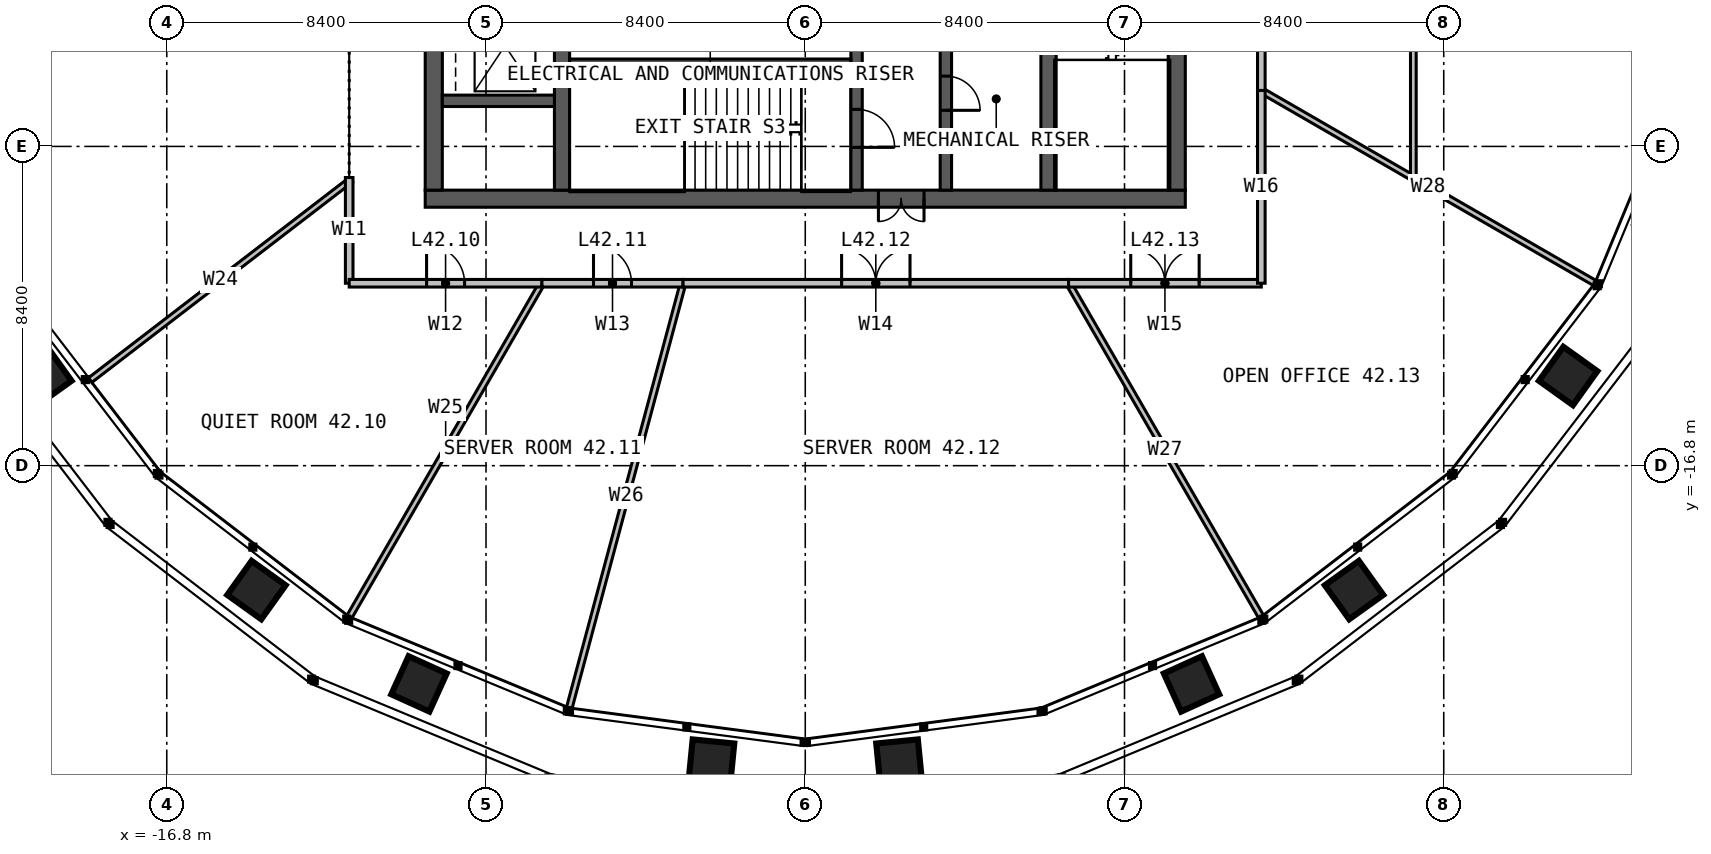
"""IFC4 building model, lengths in metres.
Left out: names, types, materials, properties, quantities, classifications, styles, units other than length and angle.
Written with IfcOpenShell. Run it as: python <this file> out.ifc"""

import sys

from ifc_helpers import new_model, si_unit, direction, frame, frame_2d, origin, place, context, subcontext, project, spatial, rectangle, extrude, element, fill, save


model = new_model("IFC4")
c1 = context("Model", 3, precision=1e-05, world=origin(), true_north=direction((0.0, 1.0)))
c2 = subcontext(c1, "Body", "Model", "MODEL_VIEW")
j1 = project(units=[si_unit("LENGTHUNIT", "METRE"), si_unit("PLANEANGLEUNIT", "RADIAN")], contexts=[c1])
p1 = place(None, origin())
s1 = spatial("IfcSite", under=j1, at=p1, CompositionType="ELEMENT")
p2 = place(p1, origin())
s2 = spatial("IfcBuilding", under=s1, at=p2, CompositionType="ELEMENT")
p3 = place(p2, frame((0.0, 0.0, 175.0)))
s3 = spatial("IfcBuildingStorey", under=s2, at=p3, CompositionType="ELEMENT", Elevation=175.0)
p4 = place(p3, frame((10.0, -9.775, 0.0), z_axis=(0.0, 0.0, 1.0), x_axis=(-1.0, 0.0, 0.0)))
e1 = element("IfcWall", 1, at=p4, inside=s3, PredefinedType="SOLIDWALL", context=c2, shape_type="SweptSolid", body=[
    extrude(rectangle(XDim=20.0, YDim=0.45, at=frame_2d((10.0, 0.0))), origin(), (0.0, 0.0, 1.0), 4.0),
])
p5 = place(p4, frame((6.875, 0.0, 0.0)))
e2 = element("IfcOpeningElement", 2, at=p5, cuts=e1, PredefinedType="OPENING", context=c2, shape_type="SweptSolid", body=[
    extrude(rectangle(XDim=1.2, YDim=2.2, at=frame_2d((0.6, 1.1))), frame((0.0, 0.235, 0.0), z_axis=(0.0, -1.0, 0.0), x_axis=(1.0, 0.0, 0.0)), (0.0, 0.0, 1.0), 0.47),
])
for number, where, z_axis, x_axis in (
    (3, (9.775, -9.55, 0.0), (0.0, 0.0, 1.0), (0.0, 1.0, 0.0)),
    (4, (-9.775, 9.55, 0.0), (0.0, 0.0, 1.0), (0.0, -1.0, 0.0)),
):
    element("IfcWall", number, at=place(p3, frame(where, z_axis=z_axis, x_axis=x_axis)), inside=s3, PredefinedType="SOLIDWALL", context=c2, shape_type="SweptSolid", body=[
        extrude(rectangle(XDim=19.1, YDim=0.45, at=frame_2d((9.55, 0.0))), origin(), (0.0, 0.0, 1.0), 4.0),
    ])
p6 = place(p3, frame((-6.4, -9.55, 0.0), z_axis=(0.0, 0.0, 1.0), x_axis=(0.0, 1.0, 0.0)))
e5 = element("IfcWall", 5, at=p6, inside=s3, PredefinedType="SOLIDWALL", context=c2, shape_type="SweptSolid", body=[
    extrude(rectangle(XDim=19.1, YDim=0.4, at=frame_2d((9.55, 0.0))), origin(), (0.0, 0.0, 1.0), 4.0),
])
p7 = place(p6, frame((9.05, 0.0, 0.0)))
e6 = element("IfcOpeningElement", 6, at=p7, cuts=e5, PredefinedType="OPENING", context=c2, shape_type="SweptSolid", body=[
    extrude(rectangle(XDim=1.0, YDim=2.2, at=frame_2d((0.5, 1.1))), frame((0.0, 0.21, 0.0), z_axis=(0.0, -1.0, 0.0), x_axis=(1.0, 0.0, 0.0)), (0.0, 0.0, 1.0), 0.42),
])
p8 = place(p3, frame((6.4, 9.55, 0.0), z_axis=(0.0, 0.0, 1.0), x_axis=(0.0, -1.0, 0.0)))
e7 = element("IfcWall", 7, at=p8, inside=s3, PredefinedType="SOLIDWALL", context=c2, shape_type="SweptSolid", body=[
    extrude(rectangle(XDim=19.1, YDim=0.4, at=frame_2d((9.55, 0.0))), origin(), (0.0, 0.0, 1.0), 4.0),
])
p9 = place(p8, frame((9.05, 0.0, 0.0)))
e8 = element("IfcOpeningElement", 8, at=p9, cuts=e7, PredefinedType="OPENING", context=c2, shape_type="SweptSolid", body=[
    extrude(rectangle(XDim=1.0, YDim=2.2, at=frame_2d((0.5, 1.1))), frame((0.0, 0.21, 0.0), z_axis=(0.0, -1.0, 0.0), x_axis=(1.0, 0.0, 0.0)), (0.0, 0.0, 1.0), 0.42),
])
p10 = place(p3, frame((1.35, -1.45, 0.0), z_axis=(0.0, 0.0, 1.0), x_axis=(0.0, -1.0, 0.0)))
e9 = element("IfcWall", 9, at=p10, inside=s3, PredefinedType="SOLIDWALL", context=c2, shape_type="SweptSolid", body=[
    extrude(rectangle(XDim=8.1, YDim=0.3, at=frame_2d((4.05, 0.0))), origin(), (0.0, 0.0, 1.0), 4.0),
])
p11 = place(p10, frame((5.975, 0.0, 0.0)))
e10 = element("IfcOpeningElement", 10, at=p11, cuts=e9, PredefinedType="OPENING", context=c2, shape_type="SweptSolid", body=[
    extrude(rectangle(XDim=1.0, YDim=2.2, at=frame_2d((0.5, 1.1))), frame((0.0, 0.16, 0.0), z_axis=(0.0, -1.0, 0.0), x_axis=(1.0, 0.0, 0.0)), (0.0, 0.0, 1.0), 0.32),
])
p12 = place(p10, frame((3.525, 0.0, 0.0)))
e11 = element("IfcOpeningElement", 11, at=p12, cuts=e9, PredefinedType="OPENING", context=c2, shape_type="SweptSolid", body=[
    extrude(rectangle(XDim=0.9, YDim=2.2, at=frame_2d((0.45, 1.1))), frame((0.0, 0.16, 0.0), z_axis=(0.0, -1.0, 0.0), x_axis=(1.0, 0.0, 0.0)), (0.0, 0.0, 1.0), 0.32),
])
p13 = place(p3, frame((3.7, -1.45, 0.0), z_axis=(0.0, 0.0, 1.0), x_axis=(0.0, -1.0, 0.0)))
e12 = element("IfcWall", 12, at=p13, inside=s3, PredefinedType="SOLIDWALL", context=c2, shape_type="SweptSolid", body=[
    extrude(rectangle(XDim=8.1, YDim=0.3, at=frame_2d((4.05, 0.0))), origin(), (0.0, 0.0, 1.0), 4.0),
])
p14 = place(p13, frame((5.1, 0.0, 0.0)))
e13 = element("IfcOpeningElement", 13, at=p14, cuts=e12, PredefinedType="OPENING", context=c2, shape_type="SweptSolid", body=[
    extrude(rectangle(XDim=0.9, YDim=2.2, at=frame_2d((0.45, 1.1))), frame((0.0, 0.16, 0.0), z_axis=(0.0, -1.0, 0.0), x_axis=(1.0, 0.0, 0.0)), (0.0, 0.0, 1.0), 0.32),
])
p15 = place(p3, frame((-6.2, -6.2, 0.0), z_axis=(0.0, 0.0, 1.0), x_axis=(1.0, 0.0, 0.0)))
e14 = element("IfcWall", 14, at=p15, inside=s3, PredefinedType="SOLIDWALL", context=c2, shape_type="SweptSolid", body=[
    extrude(rectangle(XDim=7.4, YDim=0.2, at=frame_2d((3.7, 0.0))), origin(), (0.0, 0.0, 1.0), 4.0),
])
p16 = place(p3, frame((-9.55, -7.2, 0.0), z_axis=(0.0, 0.0, 1.0), x_axis=(1.0, 0.0, 0.0)))
e15 = element("IfcWall", 15, at=p16, inside=s3, PredefinedType="SOLIDWALL", context=c2, shape_type="SweptSolid", body=[
    extrude(rectangle(XDim=2.95, YDim=0.3, at=frame_2d((1.475, 0.0))), origin(), (0.0, 0.0, 1.0), 4.0),
])
p17 = place(p3, frame((12.0, -6.928, 0.0), z_axis=(0.0, 0.0, 1.0), x_axis=(0.866025941747, -0.49999906822, 0.0)))
e16 = element("IfcWall", 16, at=p17, inside=s3, PredefinedType="PARTITIONING", context=c2, shape_type="SweptSolid", body=[
    extrude(rectangle(XDim=10.136, YDim=0.15, at=frame_2d((5.068, 0.0))), origin(), (0.0, 0.0, 1.0), 2.79),
])
p18 = place(p3, frame((-11.954, -9.278, 0.0), z_axis=(0.0, 0.0, 1.0), x_axis=(-0.793013930265, -0.609203501636, 0.0)))
e17 = element("IfcWall", 17, at=p18, inside=s3, PredefinedType="PARTITIONING", context=c2, shape_type="SweptSolid", body=[
    extrude(rectangle(XDim=8.655, YDim=0.15, at=frame_2d((4.327, 0.0))), origin(), (0.0, 0.0, 1.0), 2.79),
])
p19 = place(p3, frame((-6.928, -12.0, 0.0), z_axis=(0.0, 0.0, 1.0), x_axis=(-0.49999906822, -0.866025941747, 0.0)))
e18 = element("IfcWall", 18, at=p19, inside=s3, PredefinedType="PARTITIONING", context=c2, shape_type="SweptSolid", body=[
    extrude(rectangle(XDim=10.136, YDim=0.15, at=frame_2d((5.068, 0.0))), origin(), (0.0, 0.0, 1.0), 2.79),
])
p20 = place(p3, frame((-3.215, -12.0, 0.0), z_axis=(0.0, 0.0, 1.0), x_axis=(-0.258827502911, -0.965923559986, 0.0)))
e19 = element("IfcWall", 19, at=p20, inside=s3, PredefinedType="PARTITIONING", context=c2, shape_type="SweptSolid", body=[
    extrude(rectangle(XDim=11.569, YDim=0.15, at=frame_2d((5.785, 0.0))), origin(), (0.0, 0.0, 1.0), 2.79),
])
p21 = place(p3, frame((6.928, -12.0, 0.0), z_axis=(0.0, 0.0, 1.0), x_axis=(0.49999906822, -0.866025941747, 0.0)))
e20 = element("IfcWall", 20, at=p21, inside=s3, PredefinedType="PARTITIONING", context=c2, shape_type="SweptSolid", body=[
    extrude(rectangle(XDim=10.136, YDim=0.15, at=frame_2d((5.068, 0.0))), origin(), (0.0, 0.0, 1.0), 2.79),
])
p22 = place(p3, frame((16.0, -9.238, 0.0), z_axis=(0.0, 0.0, 1.0), x_axis=(0.0, 1.0, 0.0)))
e21 = element("IfcWall", 21, at=p22, inside=s3, PredefinedType="PARTITIONING", context=c2, shape_type="SweptSolid", body=[
    extrude(rectangle(XDim=18.475, YDim=0.15, at=frame_2d((9.238, 0.0))), origin(), (0.0, 0.0, 1.0), 2.79),
])
p23 = place(p22, frame((3.719, 0.0, 0.0)))
e22 = element("IfcOpeningElement", 22, at=p23, cuts=e21, PredefinedType="OPENING", context=c2, shape_type="SweptSolid", body=[
    extrude(rectangle(XDim=1.8, YDim=2.2, at=frame_2d((0.9, 1.1))), frame((0.0, 0.085, 0.0), z_axis=(0.0, -1.0, 0.0), x_axis=(1.0, 0.0, 0.0)), (0.0, 0.0, 1.0), 0.17),
])
p24 = place(p22, frame((12.956, 0.0, 0.0)))
e23 = element("IfcOpeningElement", 23, at=p24, cuts=e21, PredefinedType="OPENING", context=c2, shape_type="SweptSolid", body=[
    extrude(rectangle(XDim=1.8, YDim=2.2, at=frame_2d((0.9, 1.1))), frame((0.0, 0.085, 0.0), z_axis=(0.0, -1.0, 0.0), x_axis=(1.0, 0.0, 0.0)), (0.0, 0.0, 1.0), 0.17),
])
p25 = place(p3, frame((12.0, -6.928, 0.0), z_axis=(0.0, 0.0, 1.0), x_axis=(0.0, 1.0, 0.0)))
e24 = element("IfcWall", 24, at=p25, inside=s3, PredefinedType="PARTITIONING", context=c2, shape_type="SweptSolid", body=[
    extrude(rectangle(XDim=13.856, YDim=0.2, at=frame_2d((6.928, 0.0))), origin(), (0.0, 0.0, 1.0), 3.8),
])
p26 = place(p25, frame((6.028, 0.0, 0.0)))
e25 = element("IfcOpeningElement", 25, at=p26, cuts=e24, PredefinedType="OPENING", context=c2, shape_type="SweptSolid", body=[
    extrude(rectangle(XDim=1.8, YDim=2.2, at=frame_2d((0.9, 1.1))), frame((0.0, 0.11, 0.0), z_axis=(0.0, -1.0, 0.0), x_axis=(1.0, 0.0, 0.0)), (0.0, 0.0, 1.0), 0.22),
])
p27 = place(p3, frame((-12.0, -9.219, 0.0), z_axis=(0.0, 0.0, 1.0), x_axis=(0.0, -1.0, 0.0)))
e26 = element("IfcWall", 26, at=p27, inside=s3, PredefinedType="PARTITIONING", context=c2, shape_type="SweptSolid", body=[
    extrude(rectangle(XDim=2.781, YDim=0.2, at=frame_2d((1.391, 0.0))), origin(), (0.0, 0.0, 1.0), 3.8),
])
p28 = place(p3, frame((-12.0, -12.0, 0.0), z_axis=(0.0, 0.0, 1.0), x_axis=(1.0, 0.0, 0.0)))
e27 = element("IfcWall", 27, at=p28, inside=s3, PredefinedType="PARTITIONING", context=c2, shape_type="SweptSolid", body=[
    extrude(rectangle(XDim=5.072, YDim=0.2, at=frame_2d((2.536, 0.0))), origin(), (0.0, 0.0, 1.0), 3.8),
])
p29 = place(p28, frame((2.036, 0.0, 0.0)))
e28 = element("IfcOpeningElement", 28, at=p29, cuts=e27, PredefinedType="OPENING", context=c2, shape_type="SweptSolid", body=[
    extrude(rectangle(XDim=1.0, YDim=2.2, at=frame_2d((0.5, 1.1))), frame((0.0, 0.11, 0.0), z_axis=(0.0, -1.0, 0.0), x_axis=(1.0, 0.0, 0.0)), (0.0, 0.0, 1.0), 0.22),
])
p30 = place(p3, frame((-6.928, -12.0, 0.0), z_axis=(0.0, 0.0, 1.0), x_axis=(1.0, 0.0, 0.0)))
e29 = element("IfcWall", 29, at=p30, inside=s3, PredefinedType="PARTITIONING", context=c2, shape_type="SweptSolid", body=[
    extrude(rectangle(XDim=3.713, YDim=0.2, at=frame_2d((1.856, 0.0))), origin(), (0.0, 0.0, 1.0), 3.8),
])
p31 = place(p30, frame((1.356, 0.0, 0.0)))
e30 = element("IfcOpeningElement", 30, at=p31, cuts=e29, PredefinedType="OPENING", context=c2, shape_type="SweptSolid", body=[
    extrude(rectangle(XDim=1.0, YDim=2.2, at=frame_2d((0.5, 1.1))), frame((0.0, 0.11, 0.0), z_axis=(0.0, -1.0, 0.0), x_axis=(1.0, 0.0, 0.0)), (0.0, 0.0, 1.0), 0.22),
])
p32 = place(p3, frame((-3.215, -12.0, 0.0), z_axis=(0.0, 0.0, 1.0), x_axis=(1.0, 0.0, 0.0)))
e31 = element("IfcWall", 31, at=p32, inside=s3, PredefinedType="PARTITIONING", context=c2, shape_type="SweptSolid", body=[
    extrude(rectangle(XDim=10.144, YDim=0.2, at=frame_2d((5.072, 0.0))), origin(), (0.0, 0.0, 1.0), 3.8),
])
p33 = place(p32, frame((4.172, 0.0, 0.0)))
e32 = element("IfcOpeningElement", 32, at=p33, cuts=e31, PredefinedType="OPENING", context=c2, shape_type="SweptSolid", body=[
    extrude(rectangle(XDim=1.8, YDim=2.2, at=frame_2d((0.9, 1.1))), frame((0.0, 0.11, 0.0), z_axis=(0.0, -1.0, 0.0), x_axis=(1.0, 0.0, 0.0)), (0.0, 0.0, 1.0), 0.22),
])
p34 = place(p3, frame((6.928, -12.0, 0.0), z_axis=(0.0, 0.0, 1.0), x_axis=(1.0, 0.0, 0.0)))
e33 = element("IfcWall", 33, at=p34, inside=s3, PredefinedType="PARTITIONING", context=c2, shape_type="SweptSolid", body=[
    extrude(rectangle(XDim=5.072, YDim=0.2, at=frame_2d((2.536, 0.0))), origin(), (0.0, 0.0, 1.0), 3.8),
])
p35 = place(p34, frame((1.636, 0.0, 0.0)))
e34 = element("IfcOpeningElement", 34, at=p35, cuts=e33, PredefinedType="OPENING", context=c2, shape_type="SweptSolid", body=[
    extrude(rectangle(XDim=1.8, YDim=2.2, at=frame_2d((0.9, 1.1))), frame((0.0, 0.11, 0.0), z_axis=(0.0, -1.0, 0.0), x_axis=(1.0, 0.0, 0.0)), (0.0, 0.0, 1.0), 0.22),
])
p36 = place(p3, frame((12.0, -12.0, 0.0), z_axis=(0.0, 0.0, 1.0), x_axis=(0.0, 1.0, 0.0)))
e35 = element("IfcWall", 35, at=p36, inside=s3, PredefinedType="PARTITIONING", context=c2, shape_type="SweptSolid", body=[
    extrude(rectangle(XDim=5.072, YDim=0.2, at=frame_2d((2.536, 0.0))), origin(), (0.0, 0.0, 1.0), 3.8),
])
p37 = place(p5, origin())
e36 = element("IfcDoor", 36, at=p37, inside=s3, OperationType="DOUBLE_DOOR_SINGLE_SWING", PredefinedType="DOOR", context=c2, shape_type="SweptSolid", body=[
    extrude(rectangle(XDim=1.2, YDim=2.2, at=frame_2d((0.6, 1.1))), frame((0.0, 0.025, 0.0), z_axis=(0.0, -1.0, 0.0), x_axis=(1.0, 0.0, 0.0)), (0.0, 0.0, 1.0), 0.05),
])
fill(e2, e36)
p38 = place(p11, origin())
e37 = element("IfcDoor", 37, at=p38, inside=s3, OperationType="SINGLE_SWING_RIGHT", PredefinedType="DOOR", context=c2, shape_type="SweptSolid", body=[
    extrude(rectangle(XDim=1.0, YDim=2.2, at=frame_2d((0.5, 1.1))), frame((0.0, 0.025, 0.0), z_axis=(0.0, -1.0, 0.0), x_axis=(1.0, 0.0, 0.0)), (0.0, 0.0, 1.0), 0.05),
])
fill(e10, e37)
p39 = place(p14, origin())
e38 = element("IfcDoor", 38, at=p39, inside=s3, OperationType="SINGLE_SWING_RIGHT", PredefinedType="DOOR", context=c2, shape_type="SweptSolid", body=[
    extrude(rectangle(XDim=0.9, YDim=2.2, at=frame_2d((0.45, 1.1))), frame((0.0, 0.025, 0.0), z_axis=(0.0, -1.0, 0.0), x_axis=(1.0, 0.0, 0.0)), (0.0, 0.0, 1.0), 0.05),
])
fill(e13, e38)
p40 = place(p29, origin())
e39 = element("IfcDoor", 39, at=p40, inside=s3, OperationType="SINGLE_SWING_LEFT", PredefinedType="DOOR", context=c2, shape_type="SweptSolid", body=[
    extrude(rectangle(XDim=1.0, YDim=2.2, at=frame_2d((0.5, 1.1))), frame((0.0, 0.025, 0.0), z_axis=(0.0, -1.0, 0.0), x_axis=(1.0, 0.0, 0.0)), (0.0, 0.0, 1.0), 0.05),
])
fill(e28, e39)
p41 = place(p31, origin())
e40 = element("IfcDoor", 40, at=p41, inside=s3, OperationType="SINGLE_SWING_LEFT", PredefinedType="DOOR", context=c2, shape_type="SweptSolid", body=[
    extrude(rectangle(XDim=1.0, YDim=2.2, at=frame_2d((0.5, 1.1))), frame((0.0, 0.025, 0.0), z_axis=(0.0, -1.0, 0.0), x_axis=(1.0, 0.0, 0.0)), (0.0, 0.0, 1.0), 0.05),
])
fill(e30, e40)
p42 = place(p33, origin())
e41 = element("IfcDoor", 41, at=p42, inside=s3, OperationType="DOUBLE_DOOR_SINGLE_SWING", PredefinedType="DOOR", context=c2, shape_type="SweptSolid", body=[
    extrude(rectangle(XDim=1.8, YDim=2.2, at=frame_2d((0.9, 1.1))), frame((0.0, 0.025, 0.0), z_axis=(0.0, -1.0, 0.0), x_axis=(1.0, 0.0, 0.0)), (0.0, 0.0, 1.0), 0.05),
])
fill(e32, e41)
p43 = place(p35, origin())
e42 = element("IfcDoor", 42, at=p43, inside=s3, OperationType="DOUBLE_DOOR_SINGLE_SWING", PredefinedType="DOOR", context=c2, shape_type="SweptSolid", body=[
    extrude(rectangle(XDim=1.8, YDim=2.2, at=frame_2d((0.9, 1.1))), frame((0.0, 0.025, 0.0), z_axis=(0.0, -1.0, 0.0), x_axis=(1.0, 0.0, 0.0)), (0.0, 0.0, 1.0), 0.05),
])
fill(e34, e42)
save(model, sys.argv[1])
